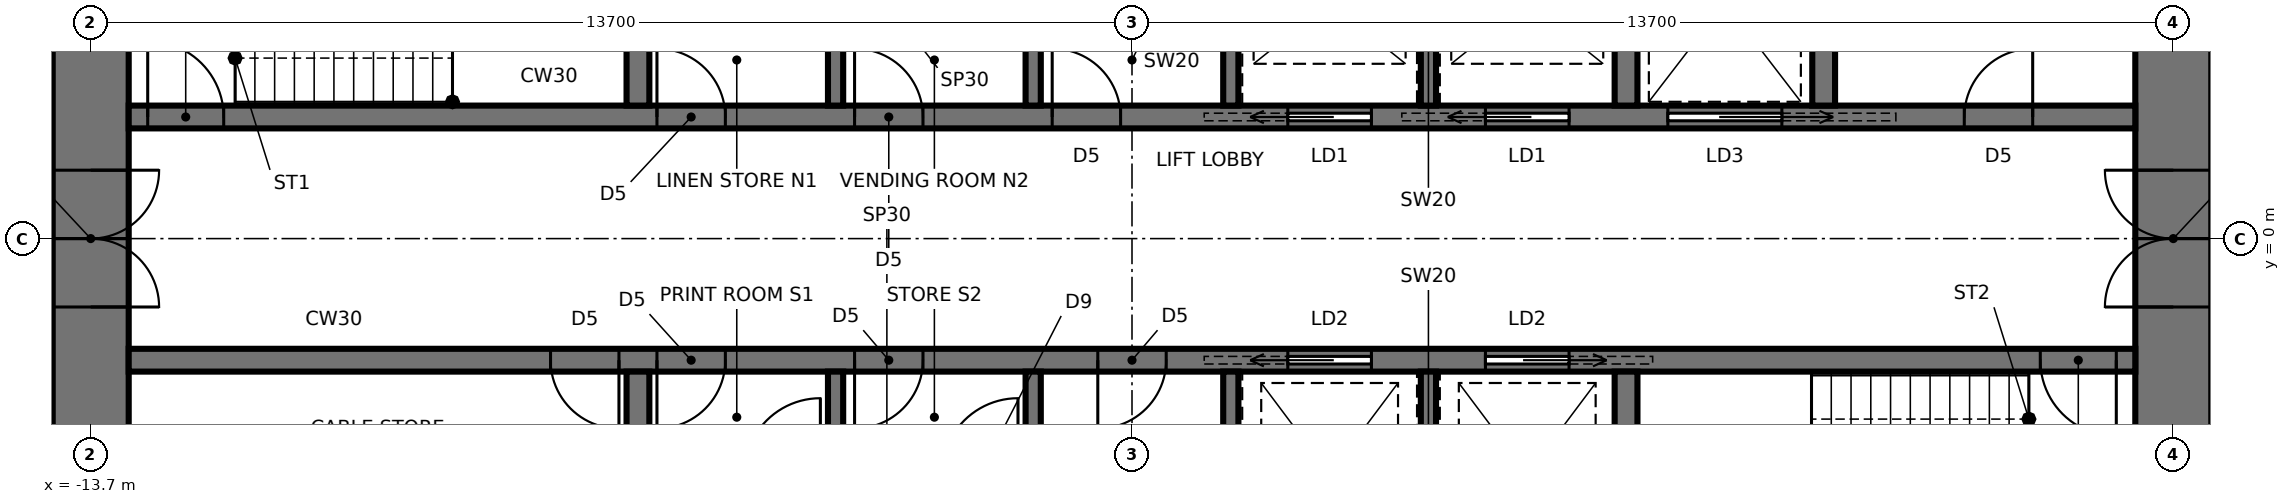
"""IFC4 building model, lengths in metres.
Left out: names, types, materials, properties, quantities, classifications, styles, units other than length and angle.
Written with IfcOpenShell. Run it as: python <this file> out.ifc"""

import sys

from ifc_helpers import new_model, si_unit, direction, frame, frame_2d, origin, place, context, subcontext, project, spatial, rectangle, extrude, element, fill, save


model = new_model("IFC4")
c1 = context("Model", 3, precision=1e-05, world=origin(), true_north=direction((0.0, 1.0)))
c2 = subcontext(c1, "Body", "Model", "MODEL_VIEW")
j1 = project(units=[si_unit("LENGTHUNIT", "METRE"), si_unit("PLANEANGLEUNIT", "RADIAN")], contexts=[c1])
p1 = place(None, origin())
s1 = spatial("IfcSite", under=j1, at=p1, CompositionType="ELEMENT")
p2 = place(p1, origin())
s2 = spatial("IfcBuilding", under=s1, at=p2, CompositionType="ELEMENT")
p3 = place(p2, frame((0.0, 0.0, 268.6)))
s3 = spatial("IfcBuildingStorey", under=s2, at=p3, CompositionType="ELEMENT", Elevation=268.6)
p4 = place(p3, frame((13.7, -9.5, 0.0), z_axis=(0.0, 0.0, 1.0), x_axis=(0.0, 1.0, 0.0)))
e1 = element("IfcWall", 1, at=p4, inside=s3, PredefinedType="SHEAR", context=c2, shape_type="SweptSolid", body=[
    extrude(rectangle(XDim=19.0, YDim=1.0, at=frame_2d((9.5, 0.0))), origin(), (0.0, 0.0, 1.0), 4.2),
])
p5 = place(p4, frame((8.6, 0.0, 0.0)))
e2 = element("IfcOpeningElement", 2, at=p5, cuts=e1, PredefinedType="OPENING", context=c2, shape_type="SweptSolid", body=[
    extrude(rectangle(XDim=1.8, YDim=2.4, at=frame_2d((0.9, 1.2))), frame((0.0, 0.51, 0.0), z_axis=(0.0, -1.0, 0.0), x_axis=(1.0, 0.0, 0.0)), (0.0, 0.0, 1.0), 1.02),
])
p6 = place(p3, frame((-13.7, 9.5, 0.0), z_axis=(0.0, 0.0, 1.0), x_axis=(0.0, -1.0, 0.0)))
e3 = element("IfcWall", 3, at=p6, inside=s3, PredefinedType="SHEAR", context=c2, shape_type="SweptSolid", body=[
    extrude(rectangle(XDim=19.0, YDim=1.0, at=frame_2d((9.5, 0.0))), origin(), (0.0, 0.0, 1.0), 4.2),
])
p7 = place(p6, frame((8.6, 0.0, 0.0)))
e4 = element("IfcOpeningElement", 4, at=p7, cuts=e3, PredefinedType="OPENING", context=c2, shape_type="SweptSolid", body=[
    extrude(rectangle(XDim=1.8, YDim=2.4, at=frame_2d((0.9, 1.2))), frame((0.0, 0.51, 0.0), z_axis=(0.0, -1.0, 0.0), x_axis=(1.0, 0.0, 0.0)), (0.0, 0.0, 1.0), 1.02),
])
p8 = place(p3, frame((-13.2, 1.6, 0.0), z_axis=(0.0, 0.0, 1.0), x_axis=(1.0, 0.0, 0.0)))
e5 = element("IfcWall", 5, at=p8, inside=s3, PredefinedType="SHEAR", context=c2, shape_type="SweptSolid", body=[
    extrude(rectangle(XDim=26.4, YDim=0.3, at=frame_2d((13.2, 0.0))), origin(), (0.0, 0.0, 1.0), 4.2),
])
p9 = place(p8, frame((0.25, 0.0, 0.0)))
e6 = element("IfcOpeningElement", 6, at=p9, cuts=e5, PredefinedType="OPENING", context=c2, shape_type="SweptSolid", body=[
    extrude(rectangle(XDim=1.0, YDim=2.1, at=frame_2d((0.5, 1.05))), frame((0.0, 0.16, 0.0), z_axis=(0.0, -1.0, 0.0), x_axis=(1.0, 0.0, 0.0)), (0.0, 0.0, 1.0), 0.32),
])
p10 = place(p8, frame((20.25, 0.0, 0.0)))
e7 = element("IfcOpeningElement", 7, at=p10, cuts=e5, PredefinedType="OPENING", context=c2, shape_type="SweptSolid", body=[
    extrude(rectangle(XDim=1.5, YDim=2.4, at=frame_2d((0.75, 1.2))), frame((0.0, 0.16, 0.0), z_axis=(0.0, -1.0, 0.0), x_axis=(1.0, 0.0, 0.0)), (0.0, 0.0, 1.0), 0.32),
])
p11 = place(p8, frame((6.95, 0.0, 0.0)))
e8 = element("IfcOpeningElement", 8, at=p11, cuts=e5, PredefinedType="OPENING", context=c2, shape_type="SweptSolid", body=[
    extrude(rectangle(XDim=0.9, YDim=2.1, at=frame_2d((0.45, 1.05))), frame((0.0, 0.16, 0.0), z_axis=(0.0, -1.0, 0.0), x_axis=(1.0, 0.0, 0.0)), (0.0, 0.0, 1.0), 0.32),
])
p12 = place(p8, frame((9.55, 0.0, 0.0)))
e9 = element("IfcOpeningElement", 9, at=p12, cuts=e5, PredefinedType="OPENING", context=c2, shape_type="SweptSolid", body=[
    extrude(rectangle(XDim=0.9, YDim=2.1, at=frame_2d((0.45, 1.05))), frame((0.0, 0.16, 0.0), z_axis=(0.0, -1.0, 0.0), x_axis=(1.0, 0.0, 0.0)), (0.0, 0.0, 1.0), 0.32),
])
p13 = place(p8, frame((12.15, 0.0, 0.0)))
e10 = element("IfcOpeningElement", 10, at=p13, cuts=e5, PredefinedType="OPENING", context=c2, shape_type="SweptSolid", body=[
    extrude(rectangle(XDim=0.9, YDim=2.1, at=frame_2d((0.45, 1.05))), frame((0.0, 0.16, 0.0), z_axis=(0.0, -1.0, 0.0), x_axis=(1.0, 0.0, 0.0)), (0.0, 0.0, 1.0), 0.32),
])
p14 = place(p8, frame((15.25, 0.0, 0.0)))
e11 = element("IfcOpeningElement", 11, at=p14, cuts=e5, PredefinedType="OPENING", context=c2, shape_type="SweptSolid", body=[
    extrude(rectangle(XDim=1.1, YDim=2.3, at=frame_2d((0.55, 1.15))), frame((0.0, 0.16, 0.0), z_axis=(0.0, -1.0, 0.0), x_axis=(1.0, 0.0, 0.0)), (0.0, 0.0, 1.0), 0.32),
])
p15 = place(p8, frame((17.85, 0.0, 0.0)))
e12 = element("IfcOpeningElement", 12, at=p15, cuts=e5, PredefinedType="OPENING", context=c2, shape_type="SweptSolid", body=[
    extrude(rectangle(XDim=1.1, YDim=2.3, at=frame_2d((0.55, 1.15))), frame((0.0, 0.16, 0.0), z_axis=(0.0, -1.0, 0.0), x_axis=(1.0, 0.0, 0.0)), (0.0, 0.0, 1.0), 0.32),
])
p16 = place(p8, frame((24.15, 0.0, 0.0)))
e13 = element("IfcOpeningElement", 13, at=p16, cuts=e5, PredefinedType="OPENING", context=c2, shape_type="SweptSolid", body=[
    extrude(rectangle(XDim=0.9, YDim=2.1, at=frame_2d((0.45, 1.05))), frame((0.0, 0.16, 0.0), z_axis=(0.0, -1.0, 0.0), x_axis=(1.0, 0.0, 0.0)), (0.0, 0.0, 1.0), 0.32),
])
p17 = place(p3, frame((-13.2, -1.6, 0.0), z_axis=(0.0, 0.0, 1.0), x_axis=(1.0, 0.0, 0.0)))
e14 = element("IfcWall", 14, at=p17, inside=s3, PredefinedType="SHEAR", context=c2, shape_type="SweptSolid", body=[
    extrude(rectangle(XDim=26.4, YDim=0.3, at=frame_2d((13.2, 0.0))), origin(), (0.0, 0.0, 1.0), 4.2),
])
p18 = place(p17, frame((25.15, 0.0, 0.0)))
e15 = element("IfcOpeningElement", 15, at=p18, cuts=e14, PredefinedType="OPENING", context=c2, shape_type="SweptSolid", body=[
    extrude(rectangle(XDim=1.0, YDim=2.1, at=frame_2d((0.5, 1.05))), frame((0.0, 0.16, 0.0), z_axis=(0.0, -1.0, 0.0), x_axis=(1.0, 0.0, 0.0)), (0.0, 0.0, 1.0), 0.32),
])
p19 = place(p17, frame((6.95, 0.0, 0.0)))
e16 = element("IfcOpeningElement", 16, at=p19, cuts=e14, PredefinedType="OPENING", context=c2, shape_type="SweptSolid", body=[
    extrude(rectangle(XDim=0.9, YDim=2.1, at=frame_2d((0.45, 1.05))), frame((0.0, 0.16, 0.0), z_axis=(0.0, -1.0, 0.0), x_axis=(1.0, 0.0, 0.0)), (0.0, 0.0, 1.0), 0.32),
])
p20 = place(p17, frame((9.55, 0.0, 0.0)))
e17 = element("IfcOpeningElement", 17, at=p20, cuts=e14, PredefinedType="OPENING", context=c2, shape_type="SweptSolid", body=[
    extrude(rectangle(XDim=0.9, YDim=2.1, at=frame_2d((0.45, 1.05))), frame((0.0, 0.16, 0.0), z_axis=(0.0, -1.0, 0.0), x_axis=(1.0, 0.0, 0.0)), (0.0, 0.0, 1.0), 0.32),
])
p21 = place(p17, frame((12.75, 0.0, 0.0)))
e18 = element("IfcOpeningElement", 18, at=p21, cuts=e14, PredefinedType="OPENING", context=c2, shape_type="SweptSolid", body=[
    extrude(rectangle(XDim=0.9, YDim=2.1, at=frame_2d((0.45, 1.05))), frame((0.0, 0.16, 0.0), z_axis=(0.0, -1.0, 0.0), x_axis=(1.0, 0.0, 0.0)), (0.0, 0.0, 1.0), 0.32),
])
p22 = place(p17, frame((15.25, 0.0, 0.0)))
e19 = element("IfcOpeningElement", 19, at=p22, cuts=e14, PredefinedType="OPENING", context=c2, shape_type="SweptSolid", body=[
    extrude(rectangle(XDim=1.1, YDim=2.3, at=frame_2d((0.55, 1.15))), frame((0.0, 0.16, 0.0), z_axis=(0.0, -1.0, 0.0), x_axis=(1.0, 0.0, 0.0)), (0.0, 0.0, 1.0), 0.32),
])
p23 = place(p17, frame((17.85, 0.0, 0.0)))
e20 = element("IfcOpeningElement", 20, at=p23, cuts=e14, PredefinedType="OPENING", context=c2, shape_type="SweptSolid", body=[
    extrude(rectangle(XDim=1.1, YDim=2.3, at=frame_2d((0.55, 1.15))), frame((0.0, 0.16, 0.0), z_axis=(0.0, -1.0, 0.0), x_axis=(1.0, 0.0, 0.0)), (0.0, 0.0, 1.0), 0.32),
])
p24 = place(p17, frame((5.55, 0.0, 0.0)))
e21 = element("IfcOpeningElement", 21, at=p24, cuts=e14, PredefinedType="OPENING", context=c2, shape_type="SweptSolid", body=[
    extrude(rectangle(XDim=0.9, YDim=2.1, at=frame_2d((0.45, 1.05))), frame((0.0, 0.16, 0.0), z_axis=(0.0, -1.0, 0.0), x_axis=(1.0, 0.0, 0.0)), (0.0, 0.0, 1.0), 0.32),
])
for number, where, z_axis, x_axis in (
    (22, (-6.5, 1.75, 0.0), (0.0, 0.0, 1.0), (0.0, 1.0, 0.0)),
    (23, (6.5, 1.75, 0.0), (0.0, 0.0, 1.0), (0.0, 1.0, 0.0)),
):
    element("IfcWall", number, at=place(p3, frame(where, z_axis=z_axis, x_axis=x_axis)), inside=s3, PredefinedType="SHEAR", context=c2, shape_type="SweptSolid", body=[
        extrude(rectangle(XDim=2.7, YDim=0.3, at=frame_2d((1.35, 0.0))), origin(), (0.0, 0.0, 1.0), 4.2),
    ])
for number, where, z_axis, x_axis in (
    (24, (-3.9, 1.75, 0.0), (0.0, 0.0, 1.0), (0.0, 1.0, 0.0)),
    (25, (-1.3, 1.75, 0.0), (0.0, 0.0, 1.0), (0.0, 1.0, 0.0)),
    (26, (1.3, 1.75, 0.0), (0.0, 0.0, 1.0), (0.0, 1.0, 0.0)),
    (27, (3.9, 1.75, 0.0), (0.0, 0.0, 1.0), (0.0, 1.0, 0.0)),
):
    element("IfcWall", number, at=place(p3, frame(where, z_axis=z_axis, x_axis=x_axis)), inside=s3, PredefinedType="SHEAR", context=c2, shape_type="SweptSolid", body=[
        extrude(rectangle(XDim=2.7, YDim=0.2, at=frame_2d((1.35, 0.0))), origin(), (0.0, 0.0, 1.0), 4.2),
    ])
for number, where, z_axis, x_axis in (
    (28, (-6.5, -1.75, 0.0), (0.0, 0.0, 1.0), (0.0, -1.0, 0.0)),
    (29, (6.5, -1.75, 0.0), (0.0, 0.0, 1.0), (0.0, -1.0, 0.0)),
):
    element("IfcWall", number, at=place(p3, frame(where, z_axis=z_axis, x_axis=x_axis)), inside=s3, PredefinedType="SHEAR", context=c2, shape_type="SweptSolid", body=[
        extrude(rectangle(XDim=2.7, YDim=0.3, at=frame_2d((1.35, 0.0))), origin(), (0.0, 0.0, 1.0), 4.2),
    ])
for number, where, z_axis, x_axis in (
    (30, (-3.9, -1.75, 0.0), (0.0, 0.0, 1.0), (0.0, -1.0, 0.0)),
    (31, (-1.3, -1.75, 0.0), (0.0, 0.0, 1.0), (0.0, -1.0, 0.0)),
    (32, (1.3, -1.75, 0.0), (0.0, 0.0, 1.0), (0.0, -1.0, 0.0)),
    (33, (3.9, -1.75, 0.0), (0.0, 0.0, 1.0), (0.0, -1.0, 0.0)),
):
    element("IfcWall", number, at=place(p3, frame(where, z_axis=z_axis, x_axis=x_axis)), inside=s3, PredefinedType="SHEAR", context=c2, shape_type="SweptSolid", body=[
        extrude(rectangle(XDim=2.7, YDim=0.2, at=frame_2d((1.35, 0.0))), origin(), (0.0, 0.0, 1.0), 4.2),
    ])
p25 = place(p3, frame((9.1, 1.75, 0.0), z_axis=(0.0, 0.0, 1.0), x_axis=(0.0, 1.0, 0.0)))
e34 = element("IfcWall", 34, at=p25, inside=s3, PredefinedType="SHEAR", context=c2, shape_type="SweptSolid", body=[
    extrude(rectangle(XDim=2.7, YDim=0.3, at=frame_2d((1.35, 0.0))), origin(), (0.0, 0.0, 1.0), 4.2),
])
p26 = place(p7, origin())
e35 = element("IfcDoor", 35, at=p26, inside=s3, OperationType="DOUBLE_DOOR_SINGLE_SWING", PredefinedType="DOOR", context=c2, shape_type="SweptSolid", body=[
    extrude(rectangle(XDim=1.72, YDim=2.36, at=frame_2d((0.9, 1.18))), frame((0.0, 0.025, 0.0), z_axis=(0.0, -1.0, 0.0), x_axis=(1.0, 0.0, 0.0)), (0.0, 0.0, 1.0), 0.05),
    extrude(rectangle(XDim=0.04, YDim=2.4, at=frame_2d((0.02, 1.2))), frame((0.0, 0.25, 0.0), z_axis=(0.0, -1.0, 0.0), x_axis=(1.0, 0.0, 0.0)), (0.0, 0.0, 1.0), 0.5),
    extrude(rectangle(XDim=0.04, YDim=2.4, at=frame_2d((1.78, 1.2))), frame((0.0, 0.25, 0.0), z_axis=(0.0, -1.0, 0.0), x_axis=(1.0, 0.0, 0.0)), (0.0, 0.0, 1.0), 0.5),
    extrude(rectangle(XDim=1.72, YDim=0.04, at=frame_2d((0.9, 2.38))), frame((0.0, 0.25, 0.0), z_axis=(0.0, -1.0, 0.0), x_axis=(1.0, 0.0, 0.0)), (0.0, 0.0, 1.0), 0.5),
])
fill(e4, e35)
p27 = place(p5, origin())
e36 = element("IfcDoor", 36, at=p27, inside=s3, OperationType="DOUBLE_DOOR_SINGLE_SWING", PredefinedType="DOOR", context=c2, shape_type="SweptSolid", body=[
    extrude(rectangle(XDim=1.72, YDim=2.36, at=frame_2d((0.9, 1.18))), frame((0.0, 0.025, 0.0), z_axis=(0.0, -1.0, 0.0), x_axis=(1.0, 0.0, 0.0)), (0.0, 0.0, 1.0), 0.05),
    extrude(rectangle(XDim=0.04, YDim=2.4, at=frame_2d((0.02, 1.2))), frame((0.0, 0.25, 0.0), z_axis=(0.0, -1.0, 0.0), x_axis=(1.0, 0.0, 0.0)), (0.0, 0.0, 1.0), 0.5),
    extrude(rectangle(XDim=0.04, YDim=2.4, at=frame_2d((1.78, 1.2))), frame((0.0, 0.25, 0.0), z_axis=(0.0, -1.0, 0.0), x_axis=(1.0, 0.0, 0.0)), (0.0, 0.0, 1.0), 0.5),
    extrude(rectangle(XDim=1.72, YDim=0.04, at=frame_2d((0.9, 2.38))), frame((0.0, 0.25, 0.0), z_axis=(0.0, -1.0, 0.0), x_axis=(1.0, 0.0, 0.0)), (0.0, 0.0, 1.0), 0.5),
])
fill(e2, e36)
p28 = place(p9, origin())
e37 = element("IfcDoor", 37, at=p28, inside=s3, OperationType="SINGLE_SWING_LEFT", PredefinedType="DOOR", context=c2, shape_type="SweptSolid", body=[
    extrude(rectangle(XDim=1.0, YDim=2.1, at=frame_2d((0.5, 1.05))), frame((0.0, 0.025, 0.0), z_axis=(0.0, -1.0, 0.0), x_axis=(1.0, 0.0, 0.0)), (0.0, 0.0, 1.0), 0.05),
])
fill(e6, e37)
p29 = place(p18, frame((1.0, 0.0, 0.0), z_axis=(0.0, 0.0, 1.0), x_axis=(-1.0, 0.0, 0.0)))
e38 = element("IfcDoor", 38, at=p29, inside=s3, OperationType="SINGLE_SWING_LEFT", PredefinedType="DOOR", context=c2, shape_type="SweptSolid", body=[
    extrude(rectangle(XDim=1.0, YDim=2.1, at=frame_2d((0.5, 1.05))), frame((0.0, 0.025, 0.0), z_axis=(0.0, -1.0, 0.0), x_axis=(1.0, 0.0, 0.0)), (0.0, 0.0, 1.0), 0.05),
])
fill(e15, e38)
p30 = place(p10, origin())
e39 = element("IfcDoor", 39, at=p30, inside=s3, OperationType="SLIDING_TO_RIGHT", PredefinedType="DOOR", context=c2, shape_type="SweptSolid", body=[
    extrude(rectangle(XDim=1.5, YDim=2.4, at=frame_2d((0.75, 1.2))), frame((0.0, 0.025, 0.0), z_axis=(0.0, -1.0, 0.0), x_axis=(1.0, 0.0, 0.0)), (0.0, 0.0, 1.0), 0.05),
])
fill(e7, e39)
p31 = place(p11, origin())
e40 = element("IfcDoor", 40, at=p31, inside=s3, OperationType="SINGLE_SWING_LEFT", PredefinedType="DOOR", context=c2, shape_type="SweptSolid", body=[
    extrude(rectangle(XDim=0.9, YDim=2.1, at=frame_2d((0.45, 1.05))), frame((0.0, 0.025, 0.0), z_axis=(0.0, -1.0, 0.0), x_axis=(1.0, 0.0, 0.0)), (0.0, 0.0, 1.0), 0.05),
])
fill(e8, e40)
p32 = place(p12, origin())
e41 = element("IfcDoor", 41, at=p32, inside=s3, OperationType="SINGLE_SWING_LEFT", PredefinedType="DOOR", context=c2, shape_type="SweptSolid", body=[
    extrude(rectangle(XDim=0.9, YDim=2.1, at=frame_2d((0.45, 1.05))), frame((0.0, 0.025, 0.0), z_axis=(0.0, -1.0, 0.0), x_axis=(1.0, 0.0, 0.0)), (0.0, 0.0, 1.0), 0.05),
])
fill(e9, e41)
p33 = place(p13, origin())
e42 = element("IfcDoor", 42, at=p33, inside=s3, OperationType="SINGLE_SWING_LEFT", PredefinedType="DOOR", context=c2, shape_type="SweptSolid", body=[
    extrude(rectangle(XDim=0.9, YDim=2.1, at=frame_2d((0.45, 1.05))), frame((0.0, 0.025, 0.0), z_axis=(0.0, -1.0, 0.0), x_axis=(1.0, 0.0, 0.0)), (0.0, 0.0, 1.0), 0.05),
])
fill(e10, e42)
p34 = place(p14, origin())
e43 = element("IfcDoor", 43, at=p34, inside=s3, OperationType="SLIDING_TO_LEFT", PredefinedType="DOOR", context=c2, shape_type="SweptSolid", body=[
    extrude(rectangle(XDim=1.1, YDim=2.3, at=frame_2d((0.55, 1.15))), frame((0.0, 0.025, 0.0), z_axis=(0.0, -1.0, 0.0), x_axis=(1.0, 0.0, 0.0)), (0.0, 0.0, 1.0), 0.05),
])
fill(e11, e43)
p35 = place(p15, origin())
e44 = element("IfcDoor", 44, at=p35, inside=s3, OperationType="SLIDING_TO_LEFT", PredefinedType="DOOR", context=c2, shape_type="SweptSolid", body=[
    extrude(rectangle(XDim=1.1, YDim=2.3, at=frame_2d((0.55, 1.15))), frame((0.0, 0.025, 0.0), z_axis=(0.0, -1.0, 0.0), x_axis=(1.0, 0.0, 0.0)), (0.0, 0.0, 1.0), 0.05),
])
fill(e12, e44)
p36 = place(p19, frame((0.9, 0.0, 0.0), z_axis=(0.0, 0.0, 1.0), x_axis=(-1.0, 0.0, 0.0)))
e45 = element("IfcDoor", 45, at=p36, inside=s3, OperationType="SINGLE_SWING_RIGHT", PredefinedType="DOOR", context=c2, shape_type="SweptSolid", body=[
    extrude(rectangle(XDim=0.9, YDim=2.1, at=frame_2d((0.45, 1.05))), frame((0.0, 0.025, 0.0), z_axis=(0.0, -1.0, 0.0), x_axis=(1.0, 0.0, 0.0)), (0.0, 0.0, 1.0), 0.05),
])
fill(e16, e45)
p37 = place(p20, frame((0.9, 0.0, 0.0), z_axis=(0.0, 0.0, 1.0), x_axis=(-1.0, 0.0, 0.0)))
e46 = element("IfcDoor", 46, at=p37, inside=s3, OperationType="SINGLE_SWING_RIGHT", PredefinedType="DOOR", context=c2, shape_type="SweptSolid", body=[
    extrude(rectangle(XDim=0.9, YDim=2.1, at=frame_2d((0.45, 1.05))), frame((0.0, 0.025, 0.0), z_axis=(0.0, -1.0, 0.0), x_axis=(1.0, 0.0, 0.0)), (0.0, 0.0, 1.0), 0.05),
])
fill(e17, e46)
p38 = place(p21, frame((0.9, 0.0, 0.0), z_axis=(0.0, 0.0, 1.0), x_axis=(-1.0, 0.0, 0.0)))
e47 = element("IfcDoor", 47, at=p38, inside=s3, OperationType="SINGLE_SWING_RIGHT", PredefinedType="DOOR", context=c2, shape_type="SweptSolid", body=[
    extrude(rectangle(XDim=0.9, YDim=2.1, at=frame_2d((0.45, 1.05))), frame((0.0, 0.025, 0.0), z_axis=(0.0, -1.0, 0.0), x_axis=(1.0, 0.0, 0.0)), (0.0, 0.0, 1.0), 0.05),
])
fill(e18, e47)
p39 = place(p22, frame((1.1, 0.0, 0.0), z_axis=(0.0, 0.0, 1.0), x_axis=(-1.0, 0.0, 0.0)))
e48 = element("IfcDoor", 48, at=p39, inside=s3, OperationType="SLIDING_TO_RIGHT", PredefinedType="DOOR", context=c2, shape_type="SweptSolid", body=[
    extrude(rectangle(XDim=1.1, YDim=2.3, at=frame_2d((0.55, 1.15))), frame((0.0, 0.025, 0.0), z_axis=(0.0, -1.0, 0.0), x_axis=(1.0, 0.0, 0.0)), (0.0, 0.0, 1.0), 0.05),
])
fill(e19, e48)
p40 = place(p23, frame((1.1, 0.0, 0.0), z_axis=(0.0, 0.0, 1.0), x_axis=(-1.0, 0.0, 0.0)))
e49 = element("IfcDoor", 49, at=p40, inside=s3, OperationType="SLIDING_TO_LEFT", PredefinedType="DOOR", context=c2, shape_type="SweptSolid", body=[
    extrude(rectangle(XDim=1.1, YDim=2.3, at=frame_2d((0.55, 1.15))), frame((0.0, 0.025, 0.0), z_axis=(0.0, -1.0, 0.0), x_axis=(1.0, 0.0, 0.0)), (0.0, 0.0, 1.0), 0.05),
])
fill(e20, e49)
p41 = place(p16, origin())
e50 = element("IfcDoor", 50, at=p41, inside=s3, OperationType="SINGLE_SWING_RIGHT", PredefinedType="DOOR", context=c2, shape_type="SweptSolid", body=[
    extrude(rectangle(XDim=0.9, YDim=2.1, at=frame_2d((0.45, 1.05))), frame((0.0, 0.025, 0.0), z_axis=(0.0, -1.0, 0.0), x_axis=(1.0, 0.0, 0.0)), (0.0, 0.0, 1.0), 0.05),
])
fill(e13, e50)
p42 = place(p24, frame((0.9, 0.0, 0.0), z_axis=(0.0, 0.0, 1.0), x_axis=(-1.0, 0.0, 0.0)))
e51 = element("IfcDoor", 51, at=p42, inside=s3, OperationType="SINGLE_SWING_LEFT", PredefinedType="DOOR", context=c2, shape_type="SweptSolid", body=[
    extrude(rectangle(XDim=0.9, YDim=2.1, at=frame_2d((0.45, 1.05))), frame((0.0, 0.025, 0.0), z_axis=(0.0, -1.0, 0.0), x_axis=(1.0, 0.0, 0.0)), (0.0, 0.0, 1.0), 0.05),
])
fill(e21, e51)
save(model, sys.argv[1])
